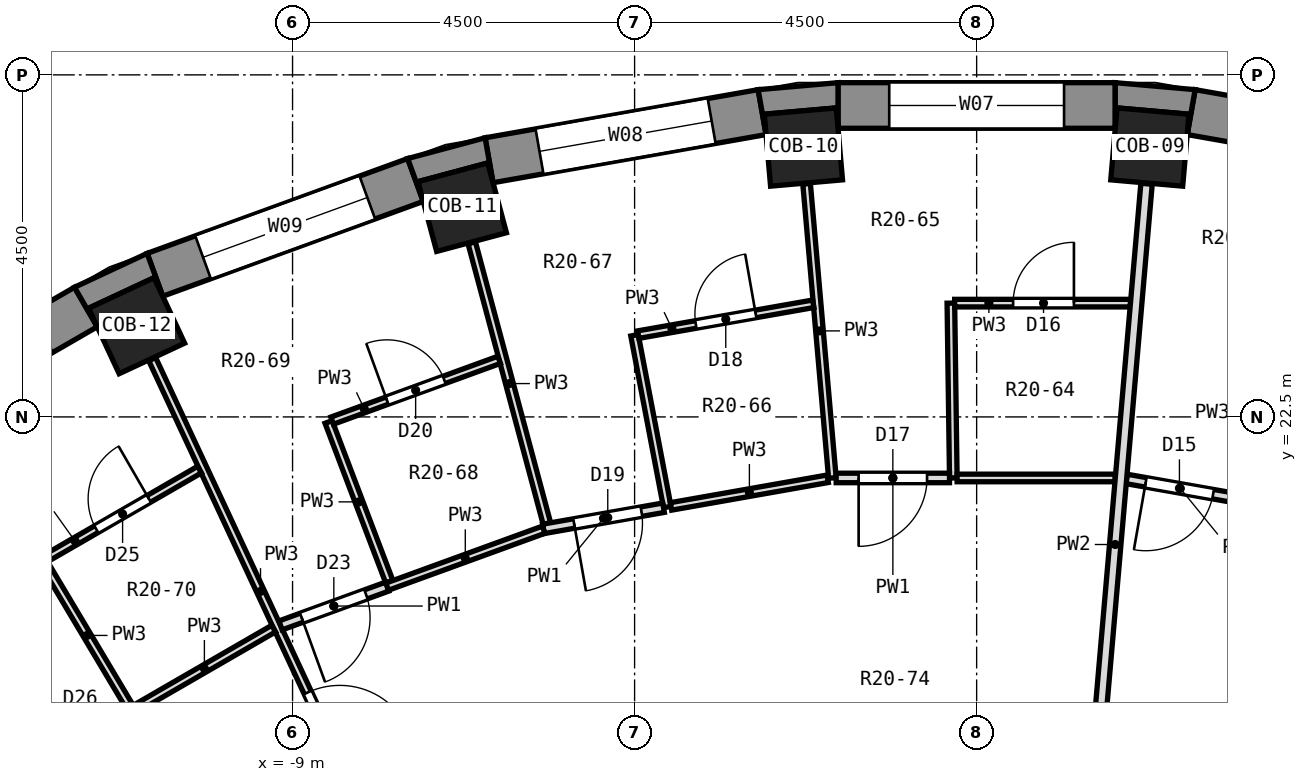
"""IFC4 building model, lengths in metres.
Left out: names, types, materials, properties, quantities, classifications, styles, units other than length and angle.
Written with IfcOpenShell. Run it as: python <this file> out.ifc"""

import sys

from ifc_helpers import new_model, si_unit, direction, frame, frame_2d, origin, origin_2d, place, context, subcontext, project, spatial, polyline, rectangle, outline, extrude, element, fill, save


model = new_model("IFC4")
c1 = context("Model", 3, precision=1e-05, world=origin(), true_north=direction((0.0, 1.0)))
c2 = subcontext(c1, "Body", "Model", "MODEL_VIEW")
j1 = project(units=[si_unit("LENGTHUNIT", "METRE"), si_unit("PLANEANGLEUNIT", "RADIAN")], contexts=[c1])
p1 = place(None, origin())
s1 = spatial("IfcSite", under=j1, at=p1, CompositionType="ELEMENT")
p2 = place(p1, origin())
s2 = spatial("IfcBuilding", under=s1, at=p2, CompositionType="ELEMENT")
p3 = place(p2, frame((0.0, 0.0, 121.6)))
s3 = spatial("IfcBuildingStorey", under=s2, at=p3, CompositionType="ELEMENT", Elevation=121.6)
for number, where, z_axis, x_axis in (
    (1, (2.279, 26.051, 0.0), (0.0, 0.0, 1.0), (0.087, 0.996, 0.0)),
    (2, (-2.279, 26.051, 0.0), (0.0, 0.0, 1.0), (-0.087, 0.996, 0.0)),
    (3, (-6.768, 25.259, 0.0), (0.0, 0.0, 1.0), (-0.259, 0.966, 0.0)),
    (4, (-11.052, 23.7, 0.0), (0.0, 0.0, 1.0), (-0.423, 0.906, 0.0)),
):
    element("IfcColumn", number, at=place(p3, frame(where, z_axis=z_axis, x_axis=x_axis)), inside=s3, PredefinedType="COLUMN", context=c2, shape_type="SweptSolid", body=[
        extrude(rectangle(XDim=0.95, YDim=0.95, at=origin_2d()), origin(), (0.0, 0.0, 1.0), 3.3),
    ])
p4 = place(p3, frame((6.415, 25.876, 0.0), z_axis=(0.0, 0.0, 1.0), x_axis=(-0.984803764455, 0.173670796382, 0.0)))
e5 = element("IfcWall", 5, at=p4, inside=s3, PredefinedType="SOLIDWALL", context=c2, shape_type="SweptSolid", body=[
    extrude(rectangle(XDim=3.648, YDim=0.6, at=frame_2d((1.824, 0.0))), origin(), (0.0, 0.0, 1.0), 2.8),
])
p5 = place(p4, frame((0.674, 0.0, 0.9)))
e6 = element("IfcOpeningElement", 6, at=p5, cuts=e5, PredefinedType="OPENING", context=c2, shape_type="SweptSolid", body=[
    extrude(rectangle(XDim=2.3, YDim=1.8, at=frame_2d((1.15, 0.9))), frame((0.0, 0.312, 0.0), z_axis=(0.0, -1.0, 0.0), x_axis=(1.0, 0.0, 0.0)), (0.0, 0.0, 1.0), 0.624),
])
p6 = place(p3, frame((1.824, 26.597, 0.0), z_axis=(0.0, 0.0, 1.0), x_axis=(-1.0, 0.0, 0.0)))
e7 = element("IfcWall", 7, at=p6, inside=s3, PredefinedType="SOLIDWALL", context=c2, shape_type="SweptSolid", body=[
    extrude(rectangle(XDim=3.648, YDim=0.6, at=frame_2d((1.824, 0.0))), origin(), (0.0, 0.0, 1.0), 2.8),
])
p7 = place(p6, frame((0.674, 0.0, 0.9)))
e8 = element("IfcOpeningElement", 8, at=p7, cuts=e7, PredefinedType="OPENING", context=c2, shape_type="SweptSolid", body=[
    extrude(rectangle(XDim=2.3, YDim=1.8, at=frame_2d((1.15, 0.9))), frame((0.0, 0.312, 0.0), z_axis=(0.0, -1.0, 0.0), x_axis=(1.0, 0.0, 0.0)), (0.0, 0.0, 1.0), 0.624),
])
p8 = place(p3, frame((-2.822, 26.51, 0.0), z_axis=(0.0, 0.0, 1.0), x_axis=(-0.984803764455, -0.173670796382, 0.0)))
e9 = element("IfcWall", 9, at=p8, inside=s3, PredefinedType="SOLIDWALL", context=c2, shape_type="SweptSolid", body=[
    extrude(rectangle(XDim=3.648, YDim=0.6, at=frame_2d((1.824, 0.0))), origin(), (0.0, 0.0, 1.0), 2.8),
])
p9 = place(p8, frame((0.674, 0.0, 0.9)))
e10 = element("IfcOpeningElement", 10, at=p9, cuts=e9, PredefinedType="OPENING", context=c2, shape_type="SweptSolid", body=[
    extrude(rectangle(XDim=2.3, YDim=1.8, at=frame_2d((1.15, 0.9))), frame((0.0, 0.312, 0.0), z_axis=(0.0, -1.0, 0.0), x_axis=(1.0, 0.0, 0.0)), (0.0, 0.0, 1.0), 0.624),
])
p10 = place(p3, frame((-7.383, 25.617, 0.0), z_axis=(0.0, 0.0, 1.0), x_axis=(-0.939703505393, -0.341990236633, 0.0)))
e11 = element("IfcWall", 11, at=p10, inside=s3, PredefinedType="SOLIDWALL", context=c2, shape_type="SweptSolid", body=[
    extrude(rectangle(XDim=3.648, YDim=0.6, at=frame_2d((1.824, 0.0))), origin(), (0.0, 0.0, 1.0), 2.8),
])
p11 = place(p10, frame((0.674, 0.0, 0.9)))
e12 = element("IfcOpeningElement", 12, at=p11, cuts=e11, PredefinedType="OPENING", context=c2, shape_type="SweptSolid", body=[
    extrude(rectangle(XDim=2.3, YDim=1.8, at=frame_2d((1.15, 0.9))), frame((0.0, 0.312, 0.0), z_axis=(0.0, -1.0, 0.0), x_axis=(1.0, 0.0, 0.0)), (0.0, 0.0, 1.0), 0.624),
])
p12 = place(p3, frame((-11.719, 23.946, 0.0), z_axis=(0.0, 0.0, 1.0), x_axis=(-0.866051847062, -0.499954196102, 0.0)))
e13 = element("IfcWall", 13, at=p12, inside=s3, PredefinedType="SOLIDWALL", context=c2, shape_type="SweptSolid", body=[
    extrude(rectangle(XDim=3.648, YDim=0.6, at=frame_2d((1.824, 0.0))), origin(), (0.0, 0.0, 1.0), 2.8),
])
p13 = place(p12, frame((0.674, 0.0, 0.9)))
e14 = element("IfcOpeningElement", 14, at=p13, cuts=e13, PredefinedType="OPENING", context=c2, shape_type="SweptSolid", body=[
    extrude(rectangle(XDim=2.3, YDim=1.8, at=frame_2d((1.15, 0.9))), frame((0.0, 0.312, 0.0), z_axis=(0.0, -1.0, 0.0), x_axis=(1.0, 0.0, 0.0)), (0.0, 0.0, 1.0), 0.624),
])
p14 = place(p3, origin())
e15 = element("IfcWall", 15, at=p14, inside=s3, PredefinedType="SOLIDWALL", context=c2, shape_type="SweptSolid", body=[
    extrude(outline(polyline([(2.875, 26.805), (1.824, 26.897), (1.824, 26.297), (1.847, 26.565), (2.794, 26.482), (2.77, 26.215), (2.875, 26.805)])), origin(), (0.0, 0.0, 1.0), 2.8),
])
p15 = place(p3, origin())
e16 = element("IfcWall", 16, at=p15, inside=s3, PredefinedType="SOLIDWALL", context=c2, shape_type="SweptSolid", body=[
    extrude(outline(polyline([(-2.875, 26.805), (-2.77, 26.215), (-2.794, 26.482), (-1.847, 26.565), (-1.824, 26.297), (-1.824, 26.897), (-2.875, 26.805)])), origin(), (0.0, 0.0, 1.0), 2.8),
])
p16 = place(p3, origin())
e17 = element("IfcWall", 17, at=p16, inside=s3, PredefinedType="SOLIDWALL", context=c2, shape_type="SweptSolid", body=[
    extrude(outline(polyline([(-6.467, 26.172), (-7.486, 25.899), (-7.28, 25.335), (-7.35, 25.595), (-6.432, 25.841), (-6.363, 25.581), (-6.467, 26.172)])), origin(), (0.0, 0.0, 1.0), 2.8),
])
p17 = place(p3, origin())
e18 = element("IfcWall", 18, at=p17, inside=s3, PredefinedType="SOLIDWALL", context=c2, shape_type="SweptSolid", body=[
    extrude(outline(polyline([(-10.913, 24.651), (-11.869, 24.206), (-11.569, 23.686), (-11.683, 23.93), (-10.822, 24.331), (-10.708, 24.087), (-10.913, 24.651)])), origin(), (0.0, 0.0, 1.0), 2.8),
])
p18 = place(p3, frame((-0.339, 23.997, 0.0), z_axis=(0.0, 0.0, 1.0), x_axis=(0.014009876351, -0.999901856866, 0.0)))
e19 = element("IfcWall", 19, at=p18, inside=s3, PredefinedType="PARTITIONING", context=c2, shape_type="SweptSolid", body=[
    extrude(rectangle(XDim=2.3, YDim=0.1, at=frame_2d((1.15, 0.0))), origin(), (0.0, 0.0, 1.0), 2.8),
])
p19 = place(p3, frame((-2.237, 25.567, 0.0), z_axis=(0.0, 0.0, 1.0), x_axis=(0.087283097701, -0.996183547774, 0.0)))
e20 = element("IfcWall", 20, at=p19, inside=s3, PredefinedType="PARTITIONING", context=c2, shape_type="SweptSolid", body=[
    extrude(rectangle(XDim=3.885, YDim=0.1, at=frame_2d((1.943, 0.0))), origin(), (0.0, 0.0, 1.0), 2.8),
])
p20 = place(p3, frame((-4.501, 23.574, 0.0), z_axis=(0.0, 0.0, 1.0), x_axis=(0.187292523019, -0.982304184467, 0.0)))
e21 = element("IfcWall", 21, at=p20, inside=s3, PredefinedType="PARTITIONING", context=c2, shape_type="SweptSolid", body=[
    extrude(rectangle(XDim=2.301, YDim=0.1, at=frame_2d((1.15, 0.0))), origin(), (0.0, 0.0, 1.0), 2.8),
])
p21 = place(p3, frame((-6.643, 24.791, 0.0), z_axis=(0.0, 0.0, 1.0), x_axis=(0.258530300991, -0.966003148789, 0.0)))
e22 = element("IfcWall", 22, at=p21, inside=s3, PredefinedType="PARTITIONING", context=c2, shape_type="SweptSolid", body=[
    extrude(rectangle(XDim=3.835, YDim=0.1, at=frame_2d((1.917, 0.0))), origin(), (0.0, 0.0, 1.0), 2.8),
])
p22 = place(p3, frame((-8.526, 22.434, 0.0), z_axis=(0.0, 0.0, 1.0), x_axis=(0.355151387301, -0.934808799754, 0.0)))
e23 = element("IfcWall", 23, at=p22, inside=s3, PredefinedType="PARTITIONING", context=c2, shape_type="SweptSolid", body=[
    extrude(rectangle(XDim=2.25, YDim=0.1, at=frame_2d((1.125, 0.0))), origin(), (0.0, 0.0, 1.0), 2.8),
])
p23 = place(p3, frame((-10.846, 23.26, 0.0), z_axis=(0.0, 0.0, 1.0), x_axis=(0.422617898312, -0.906307956506, 0.0)))
e24 = element("IfcWall", 24, at=p23, inside=s3, PredefinedType="PARTITIONING", context=c2, shape_type="SweptSolid", body=[
    extrude(rectangle(XDim=6.744, YDim=0.1, at=frame_2d((3.372, 0.0))), origin(), (0.0, 0.0, 1.0), 2.8),
])
p24 = place(p23, frame((4.839, 0.0, 0.0)))
e25 = element("IfcOpeningElement", 25, at=p24, cuts=e24, PredefinedType="OPENING", context=c2, shape_type="SweptSolid", body=[
    extrude(rectangle(XDim=1.0, YDim=2.1, at=frame_2d((0.5, 1.05))), frame((0.0, 0.062, 0.0), z_axis=(0.0, -1.0, 0.0), x_axis=(1.0, 0.0, 0.0)), (0.0, 0.0, 1.0), 0.124),
])
p25 = place(p3, frame((-12.292, 20.613, 0.0), z_axis=(0.0, 0.0, 1.0), x_axis=(0.512043462342, -0.858959540766, 0.0)))
e26 = element("IfcWall", 26, at=p25, inside=s3, PredefinedType="PARTITIONING", context=c2, shape_type="SweptSolid", body=[
    extrude(rectangle(XDim=2.301, YDim=0.1, at=frame_2d((1.15, 0.0))), origin(), (0.0, 0.0, 1.0), 2.8),
])
p26 = place(p3, frame((1.972, 21.684, 0.0), z_axis=(0.0, 0.0, 1.0), x_axis=(0.984843298649, -0.173446467555, 0.0)))
e27 = element("IfcWall", 27, at=p26, inside=s3, PredefinedType="PARTITIONING", context=c2, shape_type="SweptSolid", body=[
    extrude(rectangle(XDim=1.438, YDim=0.125, at=frame_2d((0.719, 0.0))), origin(), (0.0, 0.0, 1.0), 2.8),
])
p27 = place(p26, frame((0.257, 0.0, 0.0)))
e28 = element("IfcOpeningElement", 28, at=p27, cuts=e27, PredefinedType="OPENING", context=c2, shape_type="SweptSolid", body=[
    extrude(rectangle(XDim=0.9, YDim=2.1, at=frame_2d((0.45, 1.05))), frame((0.0, 0.074, 0.0), z_axis=(0.0, -1.0, 0.0), x_axis=(1.0, 0.0, 0.0)), (0.0, 0.0, 1.0), 0.149),
])
p28 = place(p3, frame((-0.257, 21.697, 0.0), z_axis=(0.0, 0.0, 1.0), x_axis=(1.0, 0.0, 0.0)))
e29 = element("IfcWall", 29, at=p28, inside=s3, PredefinedType="PARTITIONING", context=c2, shape_type="SweptSolid", body=[
    extrude(rectangle(XDim=2.08, YDim=0.1, at=frame_2d((1.04, 0.0))), origin(), (0.0, 0.0, 1.0), 2.8),
])
p29 = place(p3, frame((-1.848, 21.697, 0.0), z_axis=(0.0, 0.0, 1.0), x_axis=(1.0, 0.0, 0.0)))
e30 = element("IfcWall", 30, at=p29, inside=s3, PredefinedType="PARTITIONING", context=c2, shape_type="SweptSolid", body=[
    extrude(rectangle(XDim=1.491, YDim=0.125, at=frame_2d((0.746, 0.0))), origin(), (0.0, 0.0, 1.0), 2.8),
])
p30 = place(p29, frame((0.295, 0.0, 0.0)))
e31 = element("IfcOpeningElement", 31, at=p30, cuts=e30, PredefinedType="OPENING", context=c2, shape_type="SweptSolid", body=[
    extrude(rectangle(XDim=0.9, YDim=2.1, at=frame_2d((0.45, 1.05))), frame((0.0, 0.074, 0.0), z_axis=(0.0, -1.0, 0.0), x_axis=(1.0, 0.0, 0.0)), (0.0, 0.0, 1.0), 0.149),
])
p31 = place(p3, frame((-0.289, 23.997, 0.0), z_axis=(0.0, 0.0, 1.0), x_axis=(1.0, 0.0, 0.0)))
e32 = element("IfcWall", 32, at=p31, inside=s3, PredefinedType="PARTITIONING", context=c2, shape_type="SweptSolid", body=[
    extrude(rectangle(XDim=2.313, YDim=0.1, at=frame_2d((1.156, 0.0))), origin(), (0.0, 0.0, 1.0), 2.8),
])
p32 = place(p31, frame((0.769, 0.0, 0.0)))
e33 = element("IfcOpeningElement", 33, at=p32, cuts=e32, PredefinedType="OPENING", context=c2, shape_type="SweptSolid", body=[
    extrude(rectangle(XDim=0.8, YDim=2.1, at=frame_2d((0.4, 1.05))), frame((0.0, 0.062, 0.0), z_axis=(0.0, -1.0, 0.0), x_axis=(1.0, 0.0, 0.0)), (0.0, 0.0, 1.0), 0.124),
])
p33 = place(p3, frame((-4.021, 21.323, 0.0), z_axis=(0.0, 0.0, 1.0), x_axis=(0.984822285077, 0.173565742058, 0.0)))
e34 = element("IfcWall", 34, at=p33, inside=s3, PredefinedType="PARTITIONING", context=c2, shape_type="SweptSolid", body=[
    extrude(rectangle(XDim=2.093, YDim=0.1, at=frame_2d((1.046, 0.0))), origin(), (0.0, 0.0, 1.0), 2.8),
])
p34 = place(p3, frame((-5.699, 21.027, 0.0), z_axis=(0.0, 0.0, 1.0), x_axis=(0.984843235948, 0.173446823572, 0.0)))
e35 = element("IfcWall", 35, at=p34, inside=s3, PredefinedType="PARTITIONING", context=c2, shape_type="SweptSolid", body=[
    extrude(rectangle(XDim=1.605, YDim=0.125, at=frame_2d((0.802, 0.0))), origin(), (0.0, 0.0, 1.0), 2.8),
])
p35 = place(p34, frame((0.409, 0.0, 0.0)))
e36 = element("IfcOpeningElement", 36, at=p35, cuts=e35, PredefinedType="OPENING", context=c2, shape_type="SweptSolid", body=[
    extrude(rectangle(XDim=0.9, YDim=2.1, at=frame_2d((0.45, 1.05))), frame((0.0, 0.074, 0.0), z_axis=(0.0, -1.0, 0.0), x_axis=(1.0, 0.0, 0.0)), (0.0, 0.0, 1.0), 0.149),
])
p36 = place(p3, frame((-4.452, 23.583, 0.0), z_axis=(0.0, 0.0, 1.0), x_axis=(0.984842373392, 0.173451721154, 0.0)))
e37 = element("IfcWall", 37, at=p36, inside=s3, PredefinedType="PARTITIONING", context=c2, shape_type="SweptSolid", body=[
    extrude(rectangle(XDim=2.338, YDim=0.1, at=frame_2d((1.169, 0.0))), origin(), (0.0, 0.0, 1.0), 2.8),
])
p37 = place(p36, frame((0.769, 0.0, 0.0)))
e38 = element("IfcOpeningElement", 38, at=p37, cuts=e37, PredefinedType="OPENING", context=c2, shape_type="SweptSolid", body=[
    extrude(rectangle(XDim=0.8, YDim=2.1, at=frame_2d((0.4, 1.05))), frame((0.0, 0.062, 0.0), z_axis=(0.0, -1.0, 0.0), x_axis=(1.0, 0.0, 0.0)), (0.0, 0.0, 1.0), 0.124),
])
p38 = place(p3, frame((-7.759, 20.265, 0.0), z_axis=(0.0, 0.0, 1.0), x_axis=(0.9397154993, 0.341957278581, 0.0)))
e39 = element("IfcWall", 39, at=p38, inside=s3, PredefinedType="PARTITIONING", context=c2, shape_type="SweptSolid", body=[
    extrude(rectangle(XDim=2.196, YDim=0.1, at=frame_2d((1.098, 0.0))), origin(), (0.0, 0.0, 1.0), 2.8),
])
p39 = place(p3, frame((-9.158, 19.757, 0.0), z_axis=(0.0, 0.0, 1.0), x_axis=(0.939793423488, 0.341743063087, 0.0)))
e40 = element("IfcWall", 40, at=p39, inside=s3, PredefinedType="PARTITIONING", context=c2, shape_type="SweptSolid", body=[
    extrude(rectangle(XDim=1.492, YDim=0.125, at=frame_2d((0.746, 0.0))), origin(), (0.0, 0.0, 1.0), 2.8),
])
p40 = place(p39, frame((0.296, 0.0, 0.0)))
e41 = element("IfcOpeningElement", 41, at=p40, cuts=e40, PredefinedType="OPENING", context=c2, shape_type="SweptSolid", body=[
    extrude(rectangle(XDim=0.9, YDim=2.1, at=frame_2d((0.45, 1.05))), frame((0.0, 0.074, 0.0), z_axis=(0.0, -1.0, 0.0), x_axis=(1.0, 0.0, 0.0)), (0.0, 0.0, 1.0), 0.149),
])
p41 = place(p3, frame((-8.479, 22.451, 0.0), z_axis=(0.0, 0.0, 1.0), x_axis=(0.939671413828, 0.342078403345, 0.0)))
e42 = element("IfcWall", 42, at=p41, inside=s3, PredefinedType="PARTITIONING", context=c2, shape_type="SweptSolid", body=[
    extrude(rectangle(XDim=2.338, YDim=0.1, at=frame_2d((1.169, 0.0))), origin(), (0.0, 0.0, 1.0), 2.8),
])
p42 = place(p41, frame((0.769, 0.0, 0.0)))
e43 = element("IfcOpeningElement", 43, at=p42, cuts=e42, PredefinedType="OPENING", context=c2, shape_type="SweptSolid", body=[
    extrude(rectangle(XDim=0.8, YDim=2.1, at=frame_2d((0.4, 1.05))), frame((0.0, 0.062, 0.0), z_axis=(0.0, -1.0, 0.0), x_axis=(1.0, 0.0, 0.0)), (0.0, 0.0, 1.0), 0.124),
])
p43 = place(p3, frame((-11.071, 18.662, 0.0), z_axis=(0.0, 0.0, 1.0), x_axis=(0.865870655861, 0.50026793553, 0.0)))
e44 = element("IfcWall", 44, at=p43, inside=s3, PredefinedType="PARTITIONING", context=c2, shape_type="SweptSolid", body=[
    extrude(rectangle(XDim=2.105, YDim=0.1, at=frame_2d((1.052, 0.0))), origin(), (0.0, 0.0, 1.0), 2.8),
])
p44 = place(p3, frame((-12.249, 20.638, 0.0), z_axis=(0.0, 0.0, 1.0), x_axis=(0.866076057046, 0.499912255713, 0.0)))
e45 = element("IfcWall", 45, at=p44, inside=s3, PredefinedType="PARTITIONING", context=c2, shape_type="SweptSolid", body=[
    extrude(rectangle(XDim=2.338, YDim=0.1, at=frame_2d((1.169, 0.0))), origin(), (0.0, 0.0, 1.0), 2.8),
])
p45 = place(p44, frame((0.769, 0.0, 0.0)))
e46 = element("IfcOpeningElement", 46, at=p45, cuts=e45, PredefinedType="OPENING", context=c2, shape_type="SweptSolid", body=[
    extrude(rectangle(XDim=0.8, YDim=2.1, at=frame_2d((0.4, 1.05))), frame((0.0, 0.062, 0.0), z_axis=(0.0, -1.0, 0.0), x_axis=(1.0, 0.0, 0.0)), (0.0, 0.0, 1.0), 0.124),
])
p46 = place(p3, frame((1.411, 16.075, 0.0), z_axis=(0.0, 0.0, 1.0), x_axis=(0.086480343505, 0.996253557177, 0.0)))
e47 = element("IfcWall", 47, at=p46, inside=s3, PredefinedType="PARTITIONING", context=c2, shape_type="SweptSolid", body=[
    extrude(rectangle(XDim=9.528, YDim=0.15, at=frame_2d((4.764, 0.0))), origin(), (0.0, 0.0, 1.0), 2.8),
])
p47 = place(p7, origin())
e48 = element("IfcWindow", 48, at=p47, inside=s3, PartitioningType="SINGLE_PANEL", PredefinedType="WINDOW", context=c2, shape_type="SweptSolid", body=[
    extrude(rectangle(XDim=2.3, YDim=1.8, at=frame_2d((1.15, 0.9))), frame((0.0, 0.18, 0.0), z_axis=(0.0, -1.0, 0.0), x_axis=(1.0, 0.0, 0.0)), (0.0, 0.0, 1.0), 0.06),
])
fill(e8, e48)
p48 = place(p9, origin())
e49 = element("IfcWindow", 49, at=p48, inside=s3, PartitioningType="SINGLE_PANEL", PredefinedType="WINDOW", context=c2, shape_type="SweptSolid", body=[
    extrude(rectangle(XDim=2.3, YDim=1.8, at=frame_2d((1.15, 0.9))), frame((0.0, 0.18, 0.0), z_axis=(0.0, -1.0, 0.0), x_axis=(1.0, 0.0, 0.0)), (0.0, 0.0, 1.0), 0.06),
])
fill(e10, e49)
p49 = place(p11, origin())
e50 = element("IfcWindow", 50, at=p49, inside=s3, PartitioningType="SINGLE_PANEL", PredefinedType="WINDOW", context=c2, shape_type="SweptSolid", body=[
    extrude(rectangle(XDim=2.3, YDim=1.8, at=frame_2d((1.15, 0.9))), frame((0.0, 0.18, 0.0), z_axis=(0.0, -1.0, 0.0), x_axis=(1.0, 0.0, 0.0)), (0.0, 0.0, 1.0), 0.06),
])
fill(e12, e50)
p50 = place(p27, frame((0.9, 0.0, 0.0), z_axis=(0.0, 0.0, 1.0), x_axis=(-1.0, 0.0, 0.0)))
e51 = element("IfcDoor", 51, at=p50, inside=s3, OperationType="SINGLE_SWING_RIGHT", PredefinedType="DOOR", context=c2, shape_type="SweptSolid", body=[
    extrude(rectangle(XDim=0.9, YDim=2.1, at=frame_2d((0.45, 1.05))), frame((0.0, 0.025, 0.0), z_axis=(0.0, -1.0, 0.0), x_axis=(1.0, 0.0, 0.0)), (0.0, 0.0, 1.0), 0.05),
])
fill(e28, e51)
p51 = place(p32, origin())
e52 = element("IfcDoor", 52, at=p51, inside=s3, OperationType="SINGLE_SWING_RIGHT", PredefinedType="DOOR", context=c2, shape_type="SweptSolid", body=[
    extrude(rectangle(XDim=0.8, YDim=2.1, at=frame_2d((0.4, 1.05))), frame((0.0, 0.025, 0.0), z_axis=(0.0, -1.0, 0.0), x_axis=(1.0, 0.0, 0.0)), (0.0, 0.0, 1.0), 0.05),
])
fill(e33, e52)
p52 = place(p30, frame((0.9, 0.0, 0.0), z_axis=(0.0, 0.0, 1.0), x_axis=(-1.0, 0.0, 0.0)))
e53 = element("IfcDoor", 53, at=p52, inside=s3, OperationType="SINGLE_SWING_RIGHT", PredefinedType="DOOR", context=c2, shape_type="SweptSolid", body=[
    extrude(rectangle(XDim=0.9, YDim=2.1, at=frame_2d((0.45, 1.05))), frame((0.0, 0.025, 0.0), z_axis=(0.0, -1.0, 0.0), x_axis=(1.0, 0.0, 0.0)), (0.0, 0.0, 1.0), 0.05),
])
fill(e31, e53)
p53 = place(p37, origin())
e54 = element("IfcDoor", 54, at=p53, inside=s3, OperationType="SINGLE_SWING_RIGHT", PredefinedType="DOOR", context=c2, shape_type="SweptSolid", body=[
    extrude(rectangle(XDim=0.8, YDim=2.1, at=frame_2d((0.4, 1.05))), frame((0.0, 0.025, 0.0), z_axis=(0.0, -1.0, 0.0), x_axis=(1.0, 0.0, 0.0)), (0.0, 0.0, 1.0), 0.05),
])
fill(e38, e54)
p54 = place(p35, frame((0.9, 0.0, 0.0), z_axis=(0.0, 0.0, 1.0), x_axis=(-1.0, 0.0, 0.0)))
e55 = element("IfcDoor", 55, at=p54, inside=s3, OperationType="SINGLE_SWING_RIGHT", PredefinedType="DOOR", context=c2, shape_type="SweptSolid", body=[
    extrude(rectangle(XDim=0.9, YDim=2.1, at=frame_2d((0.45, 1.05))), frame((0.0, 0.025, 0.0), z_axis=(0.0, -1.0, 0.0), x_axis=(1.0, 0.0, 0.0)), (0.0, 0.0, 1.0), 0.05),
])
fill(e36, e55)
p55 = place(p42, origin())
e56 = element("IfcDoor", 56, at=p55, inside=s3, OperationType="SINGLE_SWING_LEFT", PredefinedType="DOOR", context=c2, shape_type="SweptSolid", body=[
    extrude(rectangle(XDim=0.8, YDim=2.1, at=frame_2d((0.4, 1.05))), frame((0.0, 0.025, 0.0), z_axis=(0.0, -1.0, 0.0), x_axis=(1.0, 0.0, 0.0)), (0.0, 0.0, 1.0), 0.05),
])
fill(e43, e56)
p56 = place(p40, frame((0.9, 0.0, 0.0), z_axis=(0.0, 0.0, 1.0), x_axis=(-1.0, 0.0, 0.0)))
e57 = element("IfcDoor", 57, at=p56, inside=s3, OperationType="SINGLE_SWING_RIGHT", PredefinedType="DOOR", context=c2, shape_type="SweptSolid", body=[
    extrude(rectangle(XDim=0.9, YDim=2.1, at=frame_2d((0.45, 1.05))), frame((0.0, 0.025, 0.0), z_axis=(0.0, -1.0, 0.0), x_axis=(1.0, 0.0, 0.0)), (0.0, 0.0, 1.0), 0.05),
])
fill(e41, e57)
p57 = place(p24, origin())
e58 = element("IfcDoor", 58, at=p57, inside=s3, OperationType="SINGLE_SWING_RIGHT", PredefinedType="DOOR", context=c2, shape_type="SweptSolid", body=[
    extrude(rectangle(XDim=1.0, YDim=2.1, at=frame_2d((0.5, 1.05))), frame((0.0, 0.025, 0.0), z_axis=(0.0, -1.0, 0.0), x_axis=(1.0, 0.0, 0.0)), (0.0, 0.0, 1.0), 0.05),
])
fill(e25, e58)
p58 = place(p45, origin())
e59 = element("IfcDoor", 59, at=p58, inside=s3, OperationType="SINGLE_SWING_RIGHT", PredefinedType="DOOR", context=c2, shape_type="SweptSolid", body=[
    extrude(rectangle(XDim=0.8, YDim=2.1, at=frame_2d((0.4, 1.05))), frame((0.0, 0.025, 0.0), z_axis=(0.0, -1.0, 0.0), x_axis=(1.0, 0.0, 0.0)), (0.0, 0.0, 1.0), 0.05),
])
fill(e46, e59)
save(model, sys.argv[1])
